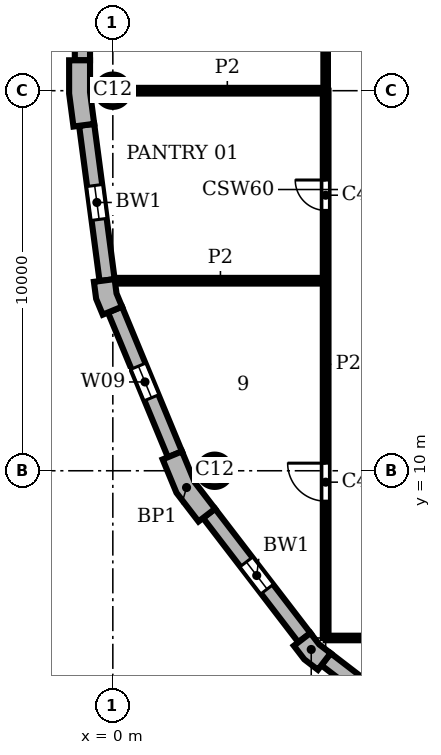
"""IFC4 building model, lengths in metres.
Left out: names, types, materials, properties, quantities, classifications, styles, units other than length and angle.
Written with IfcOpenShell. Run it as: python <this file> out.ifc"""

import sys

from ifc_helpers import new_model, si_unit, direction, frame, frame_2d, origin, origin_2d, place, context, subcontext, project, spatial, polyline, rectangle, circle, outline, extrude, element, fill, save


model = new_model("IFC4")
c1 = context("Model", 3, precision=1e-05, world=origin(), true_north=direction((0.0, 1.0)))
c2 = subcontext(c1, "Body", "Model", "MODEL_VIEW")
j1 = project(units=[si_unit("LENGTHUNIT", "METRE"), si_unit("PLANEANGLEUNIT", "RADIAN")], contexts=[c1])
p1 = place(None, origin())
s1 = spatial("IfcSite", under=j1, at=p1, CompositionType="ELEMENT")
p2 = place(p1, origin())
s2 = spatial("IfcBuilding", under=s1, at=p2, CompositionType="ELEMENT")
p3 = place(p2, frame((0.0, 0.0, 278.7)))
s3 = spatial("IfcBuildingStorey", under=s2, at=p3, CompositionType="ELEMENT", Elevation=278.7)
for number, where, z_axis, x_axis in (
    (1, (0.0, 20.0, 0.0), (0.0, 0.0, 1.0), (1.0, 0.0, 0.0)),
    (2, (2.679, 10.0, 0.0), (0.0, 0.0, 1.0), (1.0, 0.0, 0.0)),
):
    element("IfcColumn", number, at=place(p3, frame(where, z_axis=z_axis, x_axis=x_axis)), inside=s3, PredefinedType="COLUMN", context=c2, shape_type="SweptSolid", body=[
        extrude(circle(Radius=0.425, at=origin_2d()), origin(), (0.0, 0.0, 1.0), 3.9),
    ])
p4 = place(p3, origin())
e3 = element("IfcWall", 3, at=p4, inside=s3, PredefinedType="SOLIDWALL", context=c2, shape_type="SweptSolid", body=[
    extrude(outline(polyline([(-1.0, 20.8), (-1.15, 20.8), (-1.15, 19.925), (-1.036, 19.057), (-0.887, 19.076), (-0.49, 19.128), (-0.6, 19.961), (-0.6, 20.8), (-1.0, 20.8)])), origin(), (0.0, 0.0, 1.0), 3.9),
])
e4 = element("IfcWall", 4, at=p4, inside=s3, PredefinedType="SOLIDWALL", context=c2, shape_type="SweptSolid", body=[
    extrude(outline(polyline([(-0.349, 14.99), (-0.498, 14.971), (-0.439, 14.523), (-0.266, 14.106), (-0.128, 14.164), (0.242, 14.317), (0.097, 14.667), (0.047, 15.043), (-0.349, 14.99)])), origin(), (0.0, 0.0, 1.0), 3.9),
])
e5 = element("IfcWall", 5, at=p4, inside=s3, PredefinedType="SOLIDWALL", context=c2, shape_type="SweptSolid", body=[
    extrude(outline(polyline([(1.449, 10.356), (1.311, 10.299), (1.675, 9.42), (2.254, 8.665), (2.373, 8.757), (2.69, 9.0), (2.155, 9.698), (1.819, 10.51), (1.449, 10.356)])), origin(), (0.0, 0.0, 1.0), 3.9),
])
e6 = element("IfcWall", 6, at=p4, inside=s3, PredefinedType="SOLIDWALL", context=c2, shape_type="SweptSolid", body=[
    extrude(outline(polyline([(4.882, 5.487), (4.763, 5.396), (5.038, 5.038), (5.396, 4.763), (5.487, 4.882), (5.731, 5.199), (5.43, 5.43), (5.199, 5.731), (4.882, 5.487)])), origin(), (0.0, 0.0, 1.0), 3.9),
])
p5 = place(p3, frame((-0.8, 39.2, 0.0), z_axis=(0.0, 0.0, 1.0), x_axis=(0.0, -1.0, 0.0)))
e7 = element("IfcWall", 7, at=p5, inside=s3, PredefinedType="SOLIDWALL", context=c2, shape_type="SweptSolid", body=[
    extrude(rectangle(XDim=18.4, YDim=0.4, at=frame_2d((9.2, 0.0))), origin(), (0.0, 0.0, 1.0), 3.9),
])
p6 = place(p5, frame((3.75, 0.0, 0.9)))
e8 = element("IfcOpeningElement", 8, at=p6, cuts=e7, PredefinedType="OPENING", context=c2, shape_type="SweptSolid", body=[
    extrude(rectangle(XDim=0.9, YDim=2.35, at=frame_2d((0.45, 1.175))), frame((0.0, 0.21, 0.0), z_axis=(0.0, -1.0, 0.0), x_axis=(1.0, 0.0, 0.0)), (0.0, 0.0, 1.0), 0.42),
])
p7 = place(p5, frame((13.75, 0.0, 0.9)))
e9 = element("IfcOpeningElement", 9, at=p7, cuts=e7, PredefinedType="OPENING", context=c2, shape_type="SweptSolid", body=[
    extrude(rectangle(XDim=0.9, YDim=2.35, at=frame_2d((0.45, 1.175))), frame((0.0, 0.21, 0.0), z_axis=(0.0, -1.0, 0.0), x_axis=(1.0, 0.0, 0.0)), (0.0, 0.0, 1.0), 0.42),
])
p8 = place(p3, frame((-0.689, 19.102, 0.0), z_axis=(0.0, 0.0, 1.0), x_axis=(0.130514280502, -0.991446429508, 0.0)))
e10 = element("IfcWall", 10, at=p8, inside=s3, PredefinedType="SOLIDWALL", context=c2, shape_type="SweptSolid", body=[
    extrude(rectangle(XDim=4.121, YDim=0.4, at=frame_2d((2.061, 0.0))), origin(), (0.0, 0.0, 1.0), 3.9),
])
p9 = place(p8, frame((1.611, 0.0, 0.9)))
e11 = element("IfcOpeningElement", 11, at=p9, cuts=e10, PredefinedType="OPENING", context=c2, shape_type="SweptSolid", body=[
    extrude(rectangle(XDim=0.9, YDim=2.35, at=frame_2d((0.45, 1.175))), frame((0.0, 0.21, 0.0), z_axis=(0.0, -1.0, 0.0), x_axis=(1.0, 0.0, 0.0)), (0.0, 0.0, 1.0), 0.42),
])
p10 = place(p3, frame((0.057, 14.24, 0.0), z_axis=(0.0, 0.0, 1.0), x_axis=(0.382721546029, -0.923863744394, 0.0)))
e12 = element("IfcWall", 12, at=p10, inside=s3, PredefinedType="SOLIDWALL", context=c2, shape_type="SweptSolid", body=[
    extrude(rectangle(XDim=4.121, YDim=0.4, at=frame_2d((2.061, 0.0))), origin(), (0.0, 0.0, 1.0), 3.9),
])
p11 = place(p10, frame((1.611, 0.0, 0.9)))
e13 = element("IfcOpeningElement", 13, at=p11, cuts=e12, PredefinedType="OPENING", context=c2, shape_type="SweptSolid", body=[
    extrude(rectangle(XDim=0.9, YDim=2.35, at=frame_2d((0.45, 1.175))), frame((0.0, 0.21, 0.0), z_axis=(0.0, -1.0, 0.0), x_axis=(1.0, 0.0, 0.0)), (0.0, 0.0, 1.0), 0.42),
])
p12 = place(p3, frame((2.532, 8.878, 0.0), z_axis=(0.0, 0.0, 1.0), x_axis=(0.608759824817, -0.793354571229, 0.0)))
e14 = element("IfcWall", 14, at=p12, inside=s3, PredefinedType="SOLIDWALL", context=c2, shape_type="SweptSolid", body=[
    extrude(rectangle(XDim=4.121, YDim=0.4, at=frame_2d((2.061, 0.0))), origin(), (0.0, 0.0, 1.0), 3.9),
])
p13 = place(p12, frame((1.611, 0.0, 0.9)))
e15 = element("IfcOpeningElement", 15, at=p13, cuts=e14, PredefinedType="OPENING", context=c2, shape_type="SweptSolid", body=[
    extrude(rectangle(XDim=0.9, YDim=2.35, at=frame_2d((0.45, 1.175))), frame((0.0, 0.21, 0.0), z_axis=(0.0, -1.0, 0.0), x_axis=(1.0, 0.0, 0.0)), (0.0, 0.0, 1.0), 0.42),
])
p14 = place(p3, frame((5.609, 5.041, 0.0), z_axis=(0.0, 0.0, 1.0), x_axis=(0.793354571229, -0.608759824817, 0.0)))
e16 = element("IfcWall", 16, at=p14, inside=s3, PredefinedType="SOLIDWALL", context=c2, shape_type="SweptSolid", body=[
    extrude(rectangle(XDim=4.121, YDim=0.4, at=frame_2d((2.061, 0.0))), origin(), (0.0, 0.0, 1.0), 3.9),
])
p15 = place(p14, frame((1.611, 0.0, 0.9)))
e17 = element("IfcOpeningElement", 17, at=p15, cuts=e16, PredefinedType="OPENING", context=c2, shape_type="SweptSolid", body=[
    extrude(rectangle(XDim=0.9, YDim=2.35, at=frame_2d((0.45, 1.175))), frame((0.0, 0.21, 0.0), z_axis=(0.0, -1.0, 0.0), x_axis=(1.0, 0.0, 0.0)), (0.0, 0.0, 1.0), 0.42),
])
p16 = place(p3, frame((5.6, 5.6, 0.0), z_axis=(0.0, 0.0, 1.0), x_axis=(0.0, 1.0, 0.0)))
e18 = element("IfcWall", 18, at=p16, inside=s3, PredefinedType="PARTITIONING", context=c2, shape_type="SweptSolid", body=[
    extrude(rectangle(XDim=14.4, YDim=0.15, at=frame_2d((7.2, 0.0))), origin(), (0.0, 0.0, 1.0), 3.58),
])
p17 = place(p16, frame((3.6, 0.0, 0.0)))
e19 = element("IfcOpeningElement", 19, at=p17, cuts=e18, PredefinedType="OPENING", context=c2, shape_type="SweptSolid", body=[
    extrude(rectangle(XDim=1.0, YDim=2.1, at=frame_2d((0.5, 1.05))), frame((0.0, 0.085, 0.0), z_axis=(0.0, -1.0, 0.0), x_axis=(1.0, 0.0, 0.0)), (0.0, 0.0, 1.0), 0.17),
])
p18 = place(p16, frame((11.25, 0.0, 0.0)))
e20 = element("IfcOpeningElement", 20, at=p18, cuts=e18, PredefinedType="OPENING", context=c2, shape_type="SweptSolid", body=[
    extrude(rectangle(XDim=0.8, YDim=2.1, at=frame_2d((0.4, 1.05))), frame((0.0, 0.085, 0.0), z_axis=(0.0, -1.0, 0.0), x_axis=(1.0, 0.0, 0.0)), (0.0, 0.0, 1.0), 0.17),
])
p19 = place(p3, frame((0.063, 15.0, 0.0), z_axis=(0.0, 0.0, 1.0), x_axis=(1.0, 0.0, 0.0)))
e21 = element("IfcWall", 21, at=p19, inside=s3, PredefinedType="PARTITIONING", context=c2, shape_type="SweptSolid", body=[
    extrude(rectangle(XDim=5.537, YDim=0.15, at=frame_2d((2.769, 0.0))), origin(), (0.0, 0.0, 1.0), 3.58),
])
p20 = place(p3, frame((0.425, 20.0, 0.0), z_axis=(0.0, 0.0, 1.0), x_axis=(1.0, 0.0, 0.0)))
e22 = element("IfcWall", 22, at=p20, inside=s3, PredefinedType="PARTITIONING", context=c2, shape_type="SweptSolid", body=[
    extrude(rectangle(XDim=5.175, YDim=0.15, at=frame_2d((2.587, 0.0))), origin(), (0.0, 0.0, 1.0), 3.58),
])
p21 = place(p3, frame((5.6, 20.0, 0.0), z_axis=(0.0, 0.0, 1.0), x_axis=(0.0, 1.0, 0.0)))
e23 = element("IfcWall", 23, at=p21, inside=s3, PredefinedType="PARTITIONING", context=c2, shape_type="SweptSolid", body=[
    extrude(rectangle(XDim=8.0, YDim=0.12, at=frame_2d((4.0, 0.0))), origin(), (0.0, 0.0, 1.0), 3.58),
])
p22 = place(p3, frame((5.6, 5.6, 0.0), z_axis=(0.0, 0.0, 1.0), x_axis=(1.0, 0.0, 0.0)))
e24 = element("IfcWall", 24, at=p22, inside=s3, PredefinedType="PARTITIONING", context=c2, shape_type="SweptSolid", body=[
    extrude(rectangle(XDim=9.4, YDim=0.12, at=frame_2d((4.7, 0.0))), origin(), (0.0, 0.0, 1.0), 3.58),
])
p23 = place(p22, frame((4.6, 0.0, 0.0)))
e25 = element("IfcOpeningElement", 25, at=p23, cuts=e24, PredefinedType="OPENING", context=c2, shape_type="SweptSolid", body=[
    extrude(rectangle(XDim=1.0, YDim=2.1, at=frame_2d((0.5, 1.05))), frame((0.0, 0.07, 0.0), z_axis=(0.0, -1.0, 0.0), x_axis=(1.0, 0.0, 0.0)), (0.0, 0.0, 1.0), 0.14),
])
p24 = place(p9, origin())
e26 = element("IfcWindow", 26, at=p24, inside=s3, PartitioningType="SINGLE_PANEL", PredefinedType="WINDOW", context=c2, shape_type="SweptSolid", body=[
    extrude(rectangle(XDim=0.9, YDim=2.35, at=frame_2d((0.45, 1.175))), frame((0.0, 0.16, 0.0), z_axis=(0.0, -1.0, 0.0), x_axis=(1.0, 0.0, 0.0)), (0.0, 0.0, 1.0), 0.06),
])
fill(e11, e26)
p25 = place(p11, origin())
e27 = element("IfcWindow", 27, at=p25, inside=s3, PartitioningType="SINGLE_PANEL", PredefinedType="WINDOW", context=c2, shape_type="SweptSolid", body=[
    extrude(rectangle(XDim=0.9, YDim=2.35, at=frame_2d((0.45, 1.175))), frame((0.0, 0.16, 0.0), z_axis=(0.0, -1.0, 0.0), x_axis=(1.0, 0.0, 0.0)), (0.0, 0.0, 1.0), 0.06),
])
fill(e13, e27)
p26 = place(p13, origin())
e28 = element("IfcWindow", 28, at=p26, inside=s3, PartitioningType="SINGLE_PANEL", PredefinedType="WINDOW", context=c2, shape_type="SweptSolid", body=[
    extrude(rectangle(XDim=0.9, YDim=2.35, at=frame_2d((0.45, 1.175))), frame((0.0, 0.16, 0.0), z_axis=(0.0, -1.0, 0.0), x_axis=(1.0, 0.0, 0.0)), (0.0, 0.0, 1.0), 0.06),
])
fill(e15, e28)
p27 = place(p17, origin())
e29 = element("IfcDoor", 29, at=p27, inside=s3, OperationType="SINGLE_SWING_RIGHT", PredefinedType="DOOR", context=c2, shape_type="SweptSolid", body=[
    extrude(rectangle(XDim=1.0, YDim=2.1, at=frame_2d((0.5, 1.05))), frame((0.0, 0.025, 0.0), z_axis=(0.0, -1.0, 0.0), x_axis=(1.0, 0.0, 0.0)), (0.0, 0.0, 1.0), 0.05),
])
fill(e19, e29)
p28 = place(p18, origin())
e30 = element("IfcDoor", 30, at=p28, inside=s3, OperationType="SINGLE_SWING_RIGHT", PredefinedType="DOOR", context=c2, shape_type="SweptSolid", body=[
    extrude(rectangle(XDim=0.8, YDim=2.1, at=frame_2d((0.4, 1.05))), frame((0.0, 0.025, 0.0), z_axis=(0.0, -1.0, 0.0), x_axis=(1.0, 0.0, 0.0)), (0.0, 0.0, 1.0), 0.05),
])
fill(e20, e30)
save(model, sys.argv[1])
